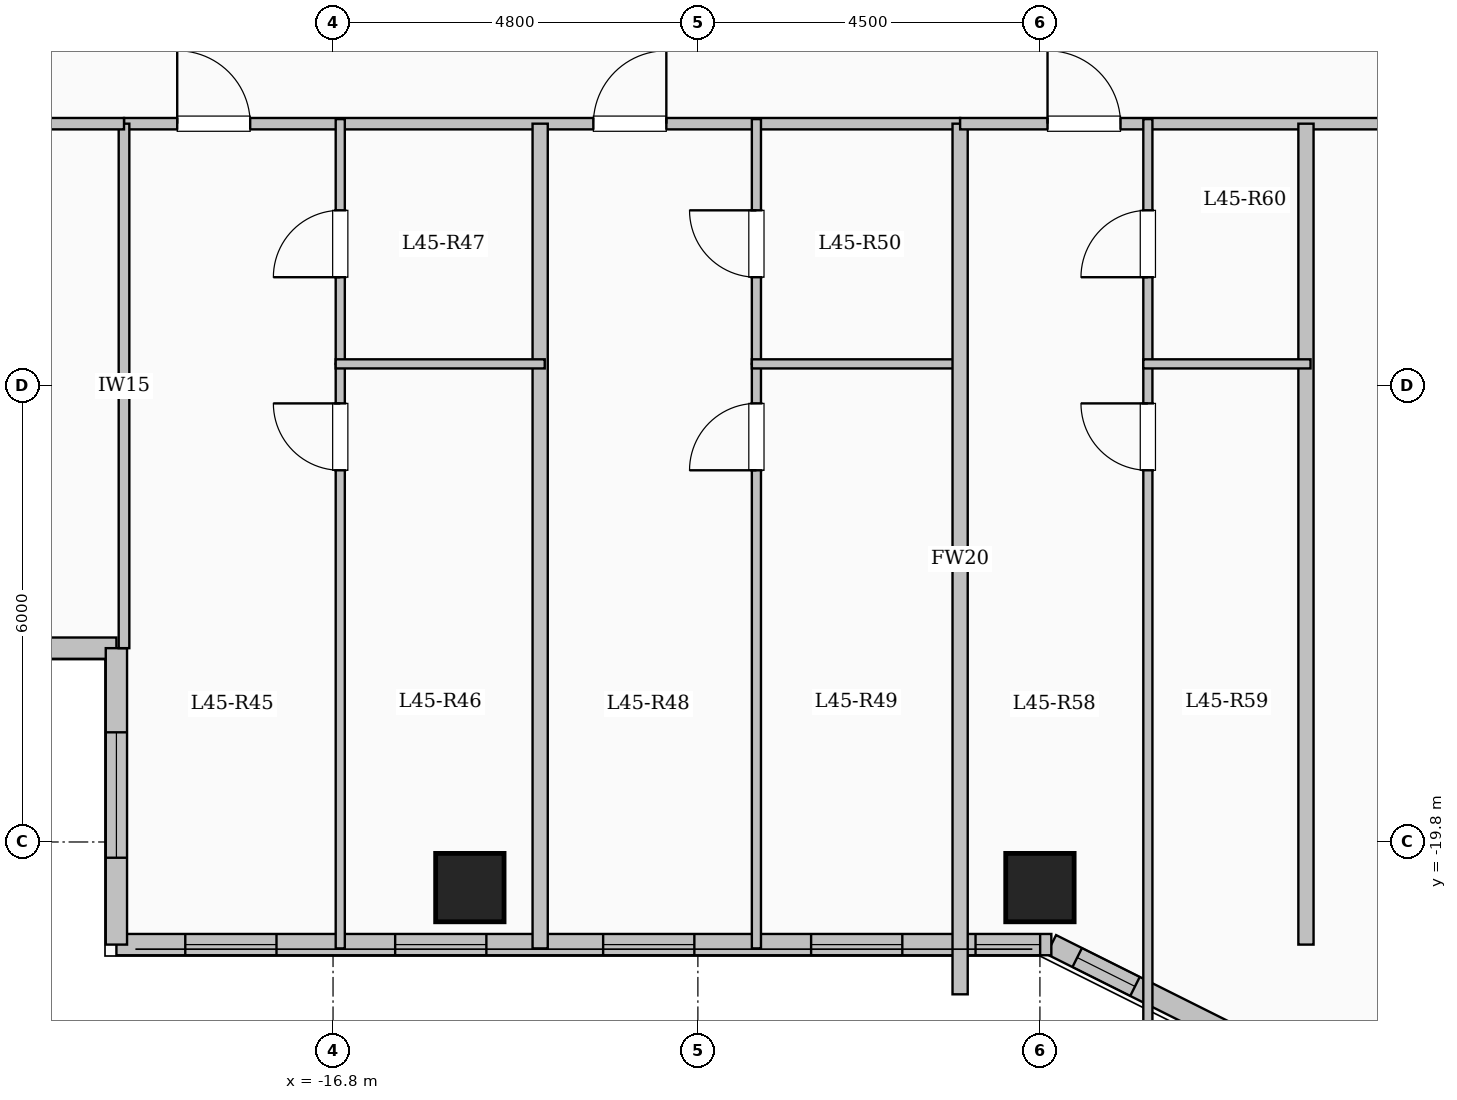
"""IFC4 building model, lengths in metres.
Left out: names, types, materials, properties, quantities, classifications, styles, units other than length and angle.
Written with IfcOpenShell. Run it as: python <this file> out.ifc"""

import sys

from ifc_helpers import new_model, si_unit, direction, frame, frame_2d, origin, origin_2d, place, context, subcontext, project, spatial, rectangle, extrude, element, fill, save


model = new_model("IFC4")
c1 = context("Model", 3, precision=1e-05, world=origin(), true_north=direction((0.0, 1.0)))
c2 = subcontext(c1, "Body", "Model", "MODEL_VIEW")
j1 = project(units=[si_unit("LENGTHUNIT", "METRE"), si_unit("PLANEANGLEUNIT", "RADIAN")], contexts=[c1])
p1 = place(None, origin())
s1 = spatial("IfcSite", under=j1, at=p1, CompositionType="ELEMENT")
p2 = place(p1, origin())
s2 = spatial("IfcBuilding", under=s1, at=p2, CompositionType="ELEMENT")
p3 = place(p2, frame((0.0, 0.0, 166.1)))
s3 = spatial("IfcBuildingStorey", under=s2, at=p3, CompositionType="ELEMENT", Elevation=166.1)
for number, where, z_axis, x_axis in (
    (1, (-15.0, -20.4, 0.0), (0.0, 0.0, 1.0), (1.0, 0.0, 0.0)),
    (2, (-7.5, -20.4, 0.0), (0.0, 0.0, 1.0), (1.0, 0.0, 0.0)),
):
    element("IfcColumn", number, at=place(p3, frame(where, z_axis=z_axis, x_axis=x_axis)), inside=s3, PredefinedType="COLUMN", context=c2, shape_type="SweptSolid", body=[
        extrude(rectangle(XDim=0.9, YDim=0.9, at=origin_2d()), origin(), (0.0, 0.0, 1.0), 3.35),
    ])
p4 = place(p3, frame((-19.65, -17.25, 0.0), z_axis=(0.0, 0.0, 1.0), x_axis=(-1.0, 0.0, 0.0)))
e3 = element("IfcWall", 3, at=p4, inside=s3, PredefinedType="SOLIDWALL", context=c2, shape_type="SweptSolid", body=[
    extrude(rectangle(XDim=5.4, YDim=0.28, at=frame_2d((2.7, 0.0))), origin(), (0.0, 0.0, 1.0), 3.1),
])
p5 = place(p4, frame((1.575, 0.0, 0.9)))
e4 = element("IfcOpeningElement", 4, at=p5, cuts=e3, PredefinedType="OPENING", context=c2, shape_type="SweptSolid", body=[
    extrude(rectangle(XDim=2.2, YDim=1.75, at=frame_2d((1.1, 0.875))), frame((0.0, 0.15, 0.0), z_axis=(0.0, -1.0, 0.0), x_axis=(1.0, 0.0, 0.0)), (0.0, 0.0, 1.0), 0.3),
])
p6 = place(p3, frame((-4.35, -22.65, 0.0), z_axis=(0.0, 0.0, 1.0), x_axis=(-0.894427191, 0.4472135955, 0.0)))
e5 = element("IfcWall", 5, at=p6, inside=s3, PredefinedType="SOLIDWALL", context=c2, shape_type="SweptSolid", body=[
    extrude(rectangle(XDim=3.354, YDim=0.28, at=frame_2d((1.677, 0.0))), origin(), (0.0, 0.0, 1.0), 3.1),
])
p7 = place(p6, frame((2.124, 0.0, 0.95)))
e6 = element("IfcOpeningElement", 6, at=p7, cuts=e5, PredefinedType="OPENING", context=c2, shape_type="SweptSolid", body=[
    extrude(rectangle(XDim=0.85, YDim=1.5, at=frame_2d((0.425, 0.75))), frame((0.0, 0.15, 0.0), z_axis=(0.0, -1.0, 0.0), x_axis=(1.0, 0.0, 0.0)), (0.0, 0.0, 1.0), 0.3),
])
p8 = place(p3, frame((-7.35, -21.15, 0.0), z_axis=(0.0, 0.0, 1.0), x_axis=(-1.0, 0.0, 0.0)))
e7 = element("IfcWall", 7, at=p8, inside=s3, PredefinedType="SOLIDWALL", context=c2, shape_type="SweptSolid", body=[
    extrude(rectangle(XDim=12.3, YDim=0.28, at=frame_2d((6.15, 0.0))), origin(), (0.0, 0.0, 1.0), 3.1),
])
p9 = place(p8, frame((0.147, 0.0, 0.95)))
e8 = element("IfcOpeningElement", 8, at=p9, cuts=e7, PredefinedType="OPENING", context=c2, shape_type="SweptSolid", body=[
    extrude(rectangle(XDim=0.85, YDim=1.5, at=frame_2d((0.425, 0.75))), frame((0.0, 0.15, 0.0), z_axis=(0.0, -1.0, 0.0), x_axis=(1.0, 0.0, 0.0)), (0.0, 0.0, 1.0), 0.3),
])
p10 = place(p8, frame((1.96, 0.0, 0.95)))
e9 = element("IfcOpeningElement", 9, at=p10, cuts=e7, PredefinedType="OPENING", context=c2, shape_type="SweptSolid", body=[
    extrude(rectangle(XDim=1.2, YDim=1.5, at=frame_2d((0.6, 0.75))), frame((0.0, 0.15, 0.0), z_axis=(0.0, -1.0, 0.0), x_axis=(1.0, 0.0, 0.0)), (0.0, 0.0, 1.0), 0.3),
])
p11 = place(p8, frame((4.697, 0.0, 0.95)))
e10 = element("IfcOpeningElement", 10, at=p11, cuts=e7, PredefinedType="OPENING", context=c2, shape_type="SweptSolid", body=[
    extrude(rectangle(XDim=1.2, YDim=1.5, at=frame_2d((0.6, 0.75))), frame((0.0, 0.15, 0.0), z_axis=(0.0, -1.0, 0.0), x_axis=(1.0, 0.0, 0.0)), (0.0, 0.0, 1.0), 0.3),
])
p12 = place(p8, frame((7.433, 0.0, 0.95)))
e11 = element("IfcOpeningElement", 11, at=p12, cuts=e7, PredefinedType="OPENING", context=c2, shape_type="SweptSolid", body=[
    extrude(rectangle(XDim=1.2, YDim=1.5, at=frame_2d((0.6, 0.75))), frame((0.0, 0.15, 0.0), z_axis=(0.0, -1.0, 0.0), x_axis=(1.0, 0.0, 0.0)), (0.0, 0.0, 1.0), 0.3),
])
p13 = place(p8, frame((10.194, 0.0, 0.95)))
e12 = element("IfcOpeningElement", 12, at=p13, cuts=e7, PredefinedType="OPENING", context=c2, shape_type="SweptSolid", body=[
    extrude(rectangle(XDim=1.2, YDim=1.5, at=frame_2d((0.6, 0.75))), frame((0.0, 0.15, 0.0), z_axis=(0.0, -1.0, 0.0), x_axis=(1.0, 0.0, 0.0)), (0.0, 0.0, 1.0), 0.3),
])
p14 = place(p3, frame((-19.65, -21.15, 0.0), z_axis=(0.0, 0.0, 1.0), x_axis=(0.0, 1.0, 0.0)))
e13 = element("IfcWall", 13, at=p14, inside=s3, PredefinedType="SOLIDWALL", context=c2, shape_type="SweptSolid", body=[
    extrude(rectangle(XDim=3.9, YDim=0.28, at=frame_2d((1.95, 0.0))), origin(), (0.0, 0.0, 1.0), 3.1),
])
p15 = place(p14, frame((1.143, 0.0, 0.9)))
e14 = element("IfcOpeningElement", 14, at=p15, cuts=e13, PredefinedType="OPENING", context=c2, shape_type="SweptSolid", body=[
    extrude(rectangle(XDim=1.65, YDim=1.6, at=frame_2d((0.825, 0.8))), frame((0.0, 0.15, 0.0), z_axis=(0.0, -1.0, 0.0), x_axis=(1.0, 0.0, 0.0)), (0.0, 0.0, 1.0), 0.3),
])
p16 = place(p3, frame((-19.55, -10.35, 0.0), z_axis=(0.0, 0.0, 1.0), x_axis=(1.0, 0.0, 0.0)))
e15 = element("IfcWall", 15, at=p16, inside=s3, PredefinedType="PARTITIONING", context=c2, shape_type="SweptSolid", body=[
    extrude(rectangle(XDim=11.0, YDim=0.15, at=frame_2d((5.5, 0.0))), origin(), (0.0, 0.0, 1.0), 3.1),
])
p17 = place(p16, frame((0.7, 0.0, 0.0)))
e16 = element("IfcOpeningElement", 16, at=p17, cuts=e15, PredefinedType="OPENING", context=c2, shape_type="SweptSolid", body=[
    extrude(rectangle(XDim=0.96, YDim=2.15, at=frame_2d((0.48, 1.075))), frame((0.0, 0.085, 0.0), z_axis=(0.0, -1.0, 0.0), x_axis=(1.0, 0.0, 0.0)), (0.0, 0.0, 1.0), 0.17),
])
p18 = place(p16, frame((6.175, 0.0, 0.0)))
e17 = element("IfcOpeningElement", 17, at=p18, cuts=e15, PredefinedType="OPENING", context=c2, shape_type="SweptSolid", body=[
    extrude(rectangle(XDim=0.96, YDim=2.15, at=frame_2d((0.48, 1.075))), frame((0.0, 0.085, 0.0), z_axis=(0.0, -1.0, 0.0), x_axis=(1.0, 0.0, 0.0)), (0.0, 0.0, 1.0), 0.17),
])
p19 = place(p3, frame((-14.075, -21.2, 0.0), z_axis=(0.0, 0.0, 1.0), x_axis=(0.0, 1.0, 0.0)))
e18 = element("IfcWall", 18, at=p19, inside=s3, PredefinedType="SOLIDWALL", context=c2, shape_type="SweptSolid", body=[
    extrude(rectangle(XDim=10.85, YDim=0.2, at=frame_2d((5.425, 0.0))), origin(), (0.0, 0.0, 1.0), 3.1),
])
p20 = place(p3, frame((-16.705, -21.2, 0.0), z_axis=(0.0, 0.0, 1.0), x_axis=(0.0, 1.0, 0.0)))
e19 = element("IfcWall", 19, at=p20, inside=s3, PredefinedType="PARTITIONING", context=c2, shape_type="SweptSolid", body=[
    extrude(rectangle(XDim=7.69, YDim=0.12, at=frame_2d((3.845, 0.0))), origin(), (0.0, 0.0, 1.0), 3.1),
])
p21 = place(p20, frame((6.29, 0.0, 0.0)))
e20 = element("IfcOpeningElement", 20, at=p21, cuts=e19, PredefinedType="OPENING", context=c2, shape_type="SweptSolid", body=[
    extrude(rectangle(XDim=0.88, YDim=2.1, at=frame_2d((0.44, 1.05))), frame((0.0, 0.07, 0.0), z_axis=(0.0, -1.0, 0.0), x_axis=(1.0, 0.0, 0.0)), (0.0, 0.0, 1.0), 0.14),
])
p22 = place(p3, frame((-16.705, -13.51, 0.0), z_axis=(0.0, 0.0, 1.0), x_axis=(0.0, 1.0, 0.0)))
e21 = element("IfcWall", 21, at=p22, inside=s3, PredefinedType="PARTITIONING", context=c2, shape_type="SweptSolid", body=[
    extrude(rectangle(XDim=3.22, YDim=0.12, at=frame_2d((1.61, 0.0))), origin(), (0.0, 0.0, 1.0), 3.1),
])
p23 = place(p22, frame((1.14, 0.0, 0.0)))
e22 = element("IfcOpeningElement", 22, at=p23, cuts=e21, PredefinedType="OPENING", context=c2, shape_type="SweptSolid", body=[
    extrude(rectangle(XDim=0.88, YDim=2.1, at=frame_2d((0.44, 1.05))), frame((0.0, 0.07, 0.0), z_axis=(0.0, -1.0, 0.0), x_axis=(1.0, 0.0, 0.0)), (0.0, 0.0, 1.0), 0.14),
])
p24 = place(p3, frame((-16.765, -13.51, 0.0), z_axis=(0.0, 0.0, 1.0), x_axis=(1.0, 0.0, 0.0)))
e23 = element("IfcWall", 23, at=p24, inside=s3, PredefinedType="PARTITIONING", context=c2, shape_type="SweptSolid", body=[
    extrude(rectangle(XDim=2.75, YDim=0.12, at=frame_2d((1.375, 0.0))), origin(), (0.0, 0.0, 1.0), 3.1),
])
p25 = place(p3, frame((-11.23, -21.2, 0.0), z_axis=(0.0, 0.0, 1.0), x_axis=(0.0, 1.0, 0.0)))
e24 = element("IfcWall", 24, at=p25, inside=s3, PredefinedType="PARTITIONING", context=c2, shape_type="SweptSolid", body=[
    extrude(rectangle(XDim=7.69, YDim=0.12, at=frame_2d((3.845, 0.0))), origin(), (0.0, 0.0, 1.0), 3.1),
])
p26 = place(p25, frame((6.29, 0.0, 0.0)))
e25 = element("IfcOpeningElement", 25, at=p26, cuts=e24, PredefinedType="OPENING", context=c2, shape_type="SweptSolid", body=[
    extrude(rectangle(XDim=0.88, YDim=2.1, at=frame_2d((0.44, 1.05))), frame((0.0, 0.07, 0.0), z_axis=(0.0, -1.0, 0.0), x_axis=(1.0, 0.0, 0.0)), (0.0, 0.0, 1.0), 0.14),
])
p27 = place(p3, frame((-11.23, -13.51, 0.0), z_axis=(0.0, 0.0, 1.0), x_axis=(0.0, 1.0, 0.0)))
e26 = element("IfcWall", 26, at=p27, inside=s3, PredefinedType="PARTITIONING", context=c2, shape_type="SweptSolid", body=[
    extrude(rectangle(XDim=3.22, YDim=0.12, at=frame_2d((1.61, 0.0))), origin(), (0.0, 0.0, 1.0), 3.1),
])
p28 = place(p27, frame((1.14, 0.0, 0.0)))
e27 = element("IfcOpeningElement", 27, at=p28, cuts=e26, PredefinedType="OPENING", context=c2, shape_type="SweptSolid", body=[
    extrude(rectangle(XDim=0.88, YDim=2.1, at=frame_2d((0.44, 1.05))), frame((0.0, 0.07, 0.0), z_axis=(0.0, -1.0, 0.0), x_axis=(1.0, 0.0, 0.0)), (0.0, 0.0, 1.0), 0.14),
])
p29 = place(p3, frame((-11.29, -13.51, 0.0), z_axis=(0.0, 0.0, 1.0), x_axis=(1.0, 0.0, 0.0)))
e28 = element("IfcWall", 28, at=p29, inside=s3, PredefinedType="PARTITIONING", context=c2, shape_type="SweptSolid", body=[
    extrude(rectangle(XDim=2.75, YDim=0.12, at=frame_2d((1.375, 0.0))), origin(), (0.0, 0.0, 1.0), 3.1),
])
p30 = place(p3, frame((-8.55, -21.804, 0.0), z_axis=(0.0, 0.0, 1.0), x_axis=(0.0, 1.0, 0.0)))
e29 = element("IfcWall", 29, at=p30, inside=s3, PredefinedType="SOLIDWALL", context=c2, shape_type="SweptSolid", body=[
    extrude(rectangle(XDim=11.454, YDim=0.2, at=frame_2d((5.727, 0.0))), origin(), (0.0, 0.0, 1.0), 3.1),
])
p31 = place(p3, frame((-8.55, -10.35, 0.0), z_axis=(0.0, 0.0, 1.0), x_axis=(1.0, 0.0, 0.0)))
e30 = element("IfcWall", 30, at=p31, inside=s3, PredefinedType="PARTITIONING", context=c2, shape_type="SweptSolid", body=[
    extrude(rectangle(XDim=17.1, YDim=0.15, at=frame_2d((8.55, 0.0))), origin(), (0.0, 0.0, 1.0), 3.1),
])
p32 = place(p31, frame((1.15, 0.0, 0.0)))
e31 = element("IfcOpeningElement", 31, at=p32, cuts=e30, PredefinedType="OPENING", context=c2, shape_type="SweptSolid", body=[
    extrude(rectangle(XDim=0.96, YDim=2.15, at=frame_2d((0.48, 1.075))), frame((0.0, 0.085, 0.0), z_axis=(0.0, -1.0, 0.0), x_axis=(1.0, 0.0, 0.0)), (0.0, 0.0, 1.0), 0.17),
])
p33 = place(p31, frame((10.5, 0.0, 0.0)))
e32 = element("IfcOpeningElement", 32, at=p33, cuts=e30, PredefinedType="OPENING", context=c2, shape_type="SweptSolid", body=[
    extrude(rectangle(XDim=0.96, YDim=2.15, at=frame_2d((0.48, 1.075))), frame((0.0, 0.085, 0.0), z_axis=(0.0, -1.0, 0.0), x_axis=(1.0, 0.0, 0.0)), (0.0, 0.0, 1.0), 0.17),
])
p34 = place(p3, frame((-4.0, -21.15, 0.0), z_axis=(0.0, 0.0, 1.0), x_axis=(0.0, 1.0, 0.0)))
e33 = element("IfcWall", 33, at=p34, inside=s3, PredefinedType="SOLIDWALL", context=c2, shape_type="SweptSolid", body=[
    extrude(rectangle(XDim=10.8, YDim=0.2, at=frame_2d((5.4, 0.0))), origin(), (0.0, 0.0, 1.0), 3.1),
])
p35 = place(p3, frame((-6.08, -22.414, 0.0), z_axis=(0.0, 0.0, 1.0), x_axis=(0.0, 1.0, 0.0)))
e34 = element("IfcWall", 34, at=p35, inside=s3, PredefinedType="PARTITIONING", context=c2, shape_type="SweptSolid", body=[
    extrude(rectangle(XDim=8.904, YDim=0.12, at=frame_2d((4.452, 0.0))), origin(), (0.0, 0.0, 1.0), 3.1),
])
p36 = place(p35, frame((7.504, 0.0, 0.0)))
e35 = element("IfcOpeningElement", 35, at=p36, cuts=e34, PredefinedType="OPENING", context=c2, shape_type="SweptSolid", body=[
    extrude(rectangle(XDim=0.88, YDim=2.1, at=frame_2d((0.44, 1.05))), frame((0.0, 0.07, 0.0), z_axis=(0.0, -1.0, 0.0), x_axis=(1.0, 0.0, 0.0)), (0.0, 0.0, 1.0), 0.14),
])
p37 = place(p3, frame((-6.08, -13.51, 0.0), z_axis=(0.0, 0.0, 1.0), x_axis=(0.0, 1.0, 0.0)))
e36 = element("IfcWall", 36, at=p37, inside=s3, PredefinedType="PARTITIONING", context=c2, shape_type="SweptSolid", body=[
    extrude(rectangle(XDim=3.22, YDim=0.12, at=frame_2d((1.61, 0.0))), origin(), (0.0, 0.0, 1.0), 3.1),
])
p38 = place(p37, frame((1.14, 0.0, 0.0)))
e37 = element("IfcOpeningElement", 37, at=p38, cuts=e36, PredefinedType="OPENING", context=c2, shape_type="SweptSolid", body=[
    extrude(rectangle(XDim=0.88, YDim=2.1, at=frame_2d((0.44, 1.05))), frame((0.0, 0.07, 0.0), z_axis=(0.0, -1.0, 0.0), x_axis=(1.0, 0.0, 0.0)), (0.0, 0.0, 1.0), 0.14),
])
p39 = place(p3, frame((-6.14, -13.51, 0.0), z_axis=(0.0, 0.0, 1.0), x_axis=(1.0, 0.0, 0.0)))
e38 = element("IfcWall", 38, at=p39, inside=s3, PredefinedType="PARTITIONING", context=c2, shape_type="SweptSolid", body=[
    extrude(rectangle(XDim=2.2, YDim=0.12, at=frame_2d((1.1, 0.0))), origin(), (0.0, 0.0, 1.0), 3.1),
])
p40 = place(p3, frame((-19.55, -17.25, 0.0), z_axis=(0.0, 0.0, 1.0), x_axis=(0.0, 1.0, 0.0)))
e39 = element("IfcWall", 39, at=p40, inside=s3, PredefinedType="PARTITIONING", context=c2, shape_type="SweptSolid", body=[
    extrude(rectangle(XDim=6.9, YDim=0.14, at=frame_2d((3.45, 0.0))), origin(), (0.0, 0.0, 1.0), 3.1),
])
p41 = place(p3, frame((-25.08, -10.35, 0.0), z_axis=(0.0, 0.0, 1.0), x_axis=(1.0, 0.0, 0.0)))
e40 = element("IfcWall", 40, at=p41, inside=s3, PredefinedType="PARTITIONING", context=c2, shape_type="SweptSolid", body=[
    extrude(rectangle(XDim=5.53, YDim=0.15, at=frame_2d((2.765, 0.0))), origin(), (0.0, 0.0, 1.0), 3.1),
])
p42 = place(p41, frame((2.29, 0.0, 0.0)))
e41 = element("IfcOpeningElement", 41, at=p42, cuts=e40, PredefinedType="OPENING", context=c2, shape_type="SweptSolid", body=[
    extrude(rectangle(XDim=0.95, YDim=2.15, at=frame_2d((0.475, 1.075))), frame((0.0, 0.085, 0.0), z_axis=(0.0, -1.0, 0.0), x_axis=(1.0, 0.0, 0.0)), (0.0, 0.0, 1.0), 0.17),
])
p43 = place(p7, origin())
e42 = element("IfcWindow", 42, at=p43, inside=s3, PartitioningType="SINGLE_PANEL", PredefinedType="WINDOW", context=c2, shape_type="SweptSolid", body=[
    extrude(rectangle(XDim=0.85, YDim=1.5, at=frame_2d((0.425, 0.75))), frame((0.0, 0.03, 0.0), z_axis=(0.0, -1.0, 0.0), x_axis=(1.0, 0.0, 0.0)), (0.0, 0.0, 1.0), 0.06),
])
fill(e6, e42)
p44 = place(p9, origin())
e43 = element("IfcWindow", 43, at=p44, inside=s3, PartitioningType="SINGLE_PANEL", PredefinedType="WINDOW", context=c2, shape_type="SweptSolid", body=[
    extrude(rectangle(XDim=0.85, YDim=1.5, at=frame_2d((0.425, 0.75))), frame((0.0, 0.03, 0.0), z_axis=(0.0, -1.0, 0.0), x_axis=(1.0, 0.0, 0.0)), (0.0, 0.0, 1.0), 0.06),
])
fill(e8, e43)
p45 = place(p10, origin())
e44 = element("IfcWindow", 44, at=p45, inside=s3, PartitioningType="SINGLE_PANEL", PredefinedType="WINDOW", context=c2, shape_type="SweptSolid", body=[
    extrude(rectangle(XDim=1.2, YDim=1.5, at=frame_2d((0.6, 0.75))), frame((0.0, 0.03, 0.0), z_axis=(0.0, -1.0, 0.0), x_axis=(1.0, 0.0, 0.0)), (0.0, 0.0, 1.0), 0.06),
])
fill(e9, e44)
p46 = place(p11, origin())
e45 = element("IfcWindow", 45, at=p46, inside=s3, PartitioningType="SINGLE_PANEL", PredefinedType="WINDOW", context=c2, shape_type="SweptSolid", body=[
    extrude(rectangle(XDim=1.2, YDim=1.5, at=frame_2d((0.6, 0.75))), frame((0.0, 0.03, 0.0), z_axis=(0.0, -1.0, 0.0), x_axis=(1.0, 0.0, 0.0)), (0.0, 0.0, 1.0), 0.06),
])
fill(e10, e45)
p47 = place(p12, origin())
e46 = element("IfcWindow", 46, at=p47, inside=s3, PartitioningType="SINGLE_PANEL", PredefinedType="WINDOW", context=c2, shape_type="SweptSolid", body=[
    extrude(rectangle(XDim=1.2, YDim=1.5, at=frame_2d((0.6, 0.75))), frame((0.0, 0.03, 0.0), z_axis=(0.0, -1.0, 0.0), x_axis=(1.0, 0.0, 0.0)), (0.0, 0.0, 1.0), 0.06),
])
fill(e11, e46)
p48 = place(p13, origin())
e47 = element("IfcWindow", 47, at=p48, inside=s3, PartitioningType="SINGLE_PANEL", PredefinedType="WINDOW", context=c2, shape_type="SweptSolid", body=[
    extrude(rectangle(XDim=1.2, YDim=1.5, at=frame_2d((0.6, 0.75))), frame((0.0, 0.03, 0.0), z_axis=(0.0, -1.0, 0.0), x_axis=(1.0, 0.0, 0.0)), (0.0, 0.0, 1.0), 0.06),
])
fill(e12, e47)
p49 = place(p15, origin())
e48 = element("IfcWindow", 48, at=p49, inside=s3, PartitioningType="SINGLE_PANEL", PredefinedType="WINDOW", context=c2, shape_type="SweptSolid", body=[
    extrude(rectangle(XDim=1.65, YDim=1.6, at=frame_2d((0.825, 0.8))), frame((0.0, 0.03, 0.0), z_axis=(0.0, -1.0, 0.0), x_axis=(1.0, 0.0, 0.0)), (0.0, 0.0, 1.0), 0.06),
])
fill(e14, e48)
p50 = place(p17, origin())
e49 = element("IfcDoor", 49, at=p50, inside=s3, OperationType="SINGLE_SWING_LEFT", PredefinedType="DOOR", context=c2, shape_type="SweptSolid", body=[
    extrude(rectangle(XDim=0.96, YDim=2.15, at=frame_2d((0.48, 1.075))), frame((0.0, 0.025, 0.0), z_axis=(0.0, -1.0, 0.0), x_axis=(1.0, 0.0, 0.0)), (0.0, 0.0, 1.0), 0.05),
])
fill(e16, e49)
p51 = place(p21, origin())
e50 = element("IfcDoor", 50, at=p51, inside=s3, OperationType="SINGLE_SWING_RIGHT", PredefinedType="DOOR", context=c2, shape_type="SweptSolid", body=[
    extrude(rectangle(XDim=0.88, YDim=2.1, at=frame_2d((0.44, 1.05))), frame((0.0, 0.025, 0.0), z_axis=(0.0, -1.0, 0.0), x_axis=(1.0, 0.0, 0.0)), (0.0, 0.0, 1.0), 0.05),
])
fill(e20, e50)
p52 = place(p23, origin())
e51 = element("IfcDoor", 51, at=p52, inside=s3, OperationType="SINGLE_SWING_LEFT", PredefinedType="DOOR", context=c2, shape_type="SweptSolid", body=[
    extrude(rectangle(XDim=0.88, YDim=2.1, at=frame_2d((0.44, 1.05))), frame((0.0, 0.025, 0.0), z_axis=(0.0, -1.0, 0.0), x_axis=(1.0, 0.0, 0.0)), (0.0, 0.0, 1.0), 0.05),
])
fill(e22, e51)
p53 = place(p18, origin())
e52 = element("IfcDoor", 52, at=p53, inside=s3, OperationType="SINGLE_SWING_RIGHT", PredefinedType="DOOR", context=c2, shape_type="SweptSolid", body=[
    extrude(rectangle(XDim=0.96, YDim=2.15, at=frame_2d((0.48, 1.075))), frame((0.0, 0.025, 0.0), z_axis=(0.0, -1.0, 0.0), x_axis=(1.0, 0.0, 0.0)), (0.0, 0.0, 1.0), 0.05),
])
fill(e17, e52)
p54 = place(p26, origin())
e53 = element("IfcDoor", 53, at=p54, inside=s3, OperationType="SINGLE_SWING_LEFT", PredefinedType="DOOR", context=c2, shape_type="SweptSolid", body=[
    extrude(rectangle(XDim=0.88, YDim=2.1, at=frame_2d((0.44, 1.05))), frame((0.0, 0.025, 0.0), z_axis=(0.0, -1.0, 0.0), x_axis=(1.0, 0.0, 0.0)), (0.0, 0.0, 1.0), 0.05),
])
fill(e25, e53)
p55 = place(p28, origin())
e54 = element("IfcDoor", 54, at=p55, inside=s3, OperationType="SINGLE_SWING_RIGHT", PredefinedType="DOOR", context=c2, shape_type="SweptSolid", body=[
    extrude(rectangle(XDim=0.88, YDim=2.1, at=frame_2d((0.44, 1.05))), frame((0.0, 0.025, 0.0), z_axis=(0.0, -1.0, 0.0), x_axis=(1.0, 0.0, 0.0)), (0.0, 0.0, 1.0), 0.05),
])
fill(e27, e54)
p56 = place(p32, origin())
e55 = element("IfcDoor", 55, at=p56, inside=s3, OperationType="SINGLE_SWING_LEFT", PredefinedType="DOOR", context=c2, shape_type="SweptSolid", body=[
    extrude(rectangle(XDim=0.96, YDim=2.15, at=frame_2d((0.48, 1.075))), frame((0.0, 0.025, 0.0), z_axis=(0.0, -1.0, 0.0), x_axis=(1.0, 0.0, 0.0)), (0.0, 0.0, 1.0), 0.05),
])
fill(e31, e55)
p57 = place(p36, origin())
e56 = element("IfcDoor", 56, at=p57, inside=s3, OperationType="SINGLE_SWING_RIGHT", PredefinedType="DOOR", context=c2, shape_type="SweptSolid", body=[
    extrude(rectangle(XDim=0.88, YDim=2.1, at=frame_2d((0.44, 1.05))), frame((0.0, 0.025, 0.0), z_axis=(0.0, -1.0, 0.0), x_axis=(1.0, 0.0, 0.0)), (0.0, 0.0, 1.0), 0.05),
])
fill(e35, e56)
p58 = place(p38, origin())
e57 = element("IfcDoor", 57, at=p58, inside=s3, OperationType="SINGLE_SWING_LEFT", PredefinedType="DOOR", context=c2, shape_type="SweptSolid", body=[
    extrude(rectangle(XDim=0.88, YDim=2.1, at=frame_2d((0.44, 1.05))), frame((0.0, 0.025, 0.0), z_axis=(0.0, -1.0, 0.0), x_axis=(1.0, 0.0, 0.0)), (0.0, 0.0, 1.0), 0.05),
])
fill(e37, e57)
save(model, sys.argv[1])
